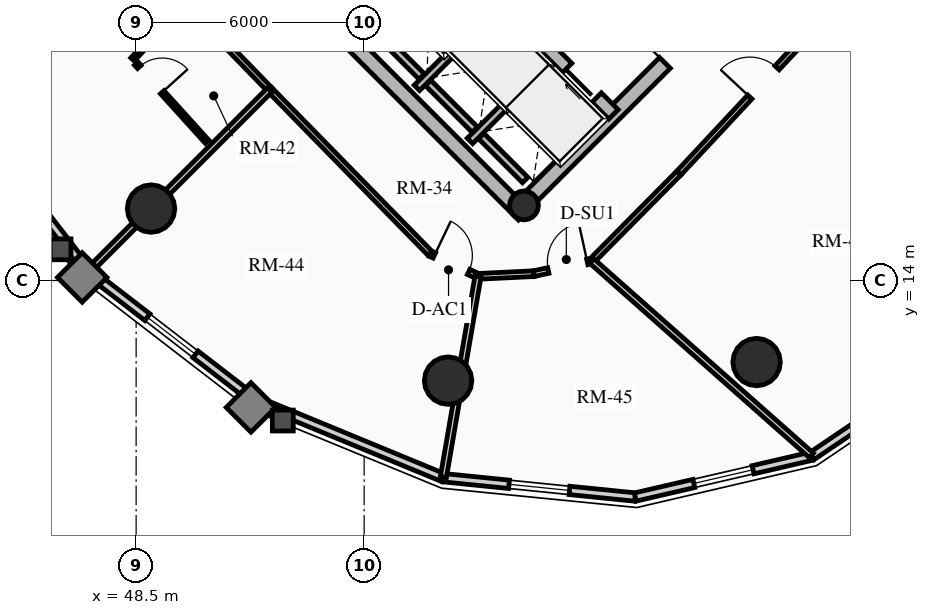
"""IFC4 building model, lengths in metres.
Left out: names, types, materials, properties, quantities, classifications, styles, units other than length and angle.
Written with IfcOpenShell. Run it as: python <this file> out.ifc"""

import sys

from ifc_helpers import new_model, si_unit, direction, frame, frame_2d, origin, origin_2d, place, context, subcontext, project, spatial, rectangle, circle, hollow_circle, extrude, source, transform, mapped, element, fill, save


model = new_model("IFC4")
c1 = context("Model", 3, precision=1e-05, world=origin(), true_north=direction((0.0, 1.0)))
c2 = subcontext(c1, "Body", "Model", "MODEL_VIEW")
j1 = project(units=[si_unit("LENGTHUNIT", "METRE"), si_unit("PLANEANGLEUNIT", "RADIAN")], contexts=[c1])
p1 = place(None, origin())
s1 = spatial("IfcSite", under=j1, at=p1, CompositionType="ELEMENT")
p2 = place(p1, origin())
s2 = spatial("IfcBuilding", under=s1, at=p2, CompositionType="ELEMENT")
p3 = place(p2, frame((0.0, 0.0, 151.6)))
s3 = spatial("IfcBuildingStorey", under=s2, at=p3, CompositionType="ELEMENT", Elevation=151.6)
p4 = place(p3, frame((58.702, 15.732, 0.0), z_axis=(0.0, 0.0, 1.0), x_axis=(-0.707106781187, 0.707106781187, 0.0)))
e1 = element("IfcWall", 1, at=p4, inside=s3, PredefinedType="SHEAR", context=c2, shape_type="SweptSolid", body=[
    extrude(rectangle(XDim=14.1, YDim=0.4, at=frame_2d((7.05, 0.0))), origin(), (0.0, 0.0, 1.0), 2.91),
])
p5 = place(p3, frame((58.561, 15.873, 0.0), z_axis=(0.0, 0.0, 1.0), x_axis=(0.707106781187, 0.707106781187, 0.0)))
e2 = element("IfcWall", 2, at=p5, inside=s3, PredefinedType="SHEAR", context=c2, shape_type="SweptSolid", body=[
    extrude(rectangle(XDim=10.7, YDim=0.4, at=frame_2d((5.35, 0.0))), origin(), (0.0, 0.0, 1.0), 2.91),
])
m1 = source(origin(), c2, "Body", "SweptSolid", [
    extrude(rectangle(XDim=1.5, YDim=2.02, at=frame_2d((0.75, 1.01))), frame((0.0, 0.21, 0.0), z_axis=(0.0, -1.0, 0.0), x_axis=(1.0, 0.0, 0.0)), (0.0, 0.0, 1.0), 0.42),
])
p6 = place(p5, frame((5.45, 0.0, 0.0)))
e3 = element("IfcOpeningElement", 3, at=p6, cuts=e2, PredefinedType="OPENING", context=c2, shape_type="MappedRepresentation", body=[
    mapped(m1, transform((0.0, 0.0, 0.0), x_axis=(1.0, 0.0, 0.0), y_axis=(0.0, 1.0, 0.0), z_axis=(0.0, 0.0, 1.0), scale=1.0)),
])
p7 = place(p3, frame((61.06, 18.373, 0.0), z_axis=(0.0, 0.0, 1.0), x_axis=(-0.707106781187, 0.707106781187, 0.0)))
e4 = element("IfcWall", 4, at=p7, inside=s3, PredefinedType="SHEAR", context=c2, shape_type="SweptSolid", body=[
    extrude(rectangle(XDim=13.7, YDim=0.35, at=frame_2d((6.85, 0.0))), origin(), (0.0, 0.0, 1.0), 2.91),
])
m2 = source(origin(), c2, "Body", "SweptSolid", [
    extrude(rectangle(XDim=1.1, YDim=2.015, at=frame_2d((0.55, 1.007))), frame((0.0, 0.185, 0.0), z_axis=(0.0, -1.0, 0.0), x_axis=(1.0, 0.0, 0.0)), (0.0, 0.0, 1.0), 0.37),
])
p8 = place(p7, frame((4.85, 0.0, 0.0)))
e5 = element("IfcOpeningElement", 5, at=p8, cuts=e4, PredefinedType="OPENING", context=c2, shape_type="MappedRepresentation", body=[
    mapped(m2, transform((0.0, 0.0, 0.0), x_axis=(1.0, 0.0, 0.0), y_axis=(0.0, 1.0, 0.0), z_axis=(0.0, 0.0, 1.0), scale=1.0)),
])
p9 = place(p7, frame((0.625, 0.0, 0.0)))
e6 = element("IfcOpeningElement", 6, at=p9, cuts=e4, PredefinedType="OPENING", context=c2, shape_type="MappedRepresentation", body=[
    mapped(m2, transform((0.0, 0.0, 0.0), x_axis=(1.0, 0.0, 0.0), y_axis=(0.0, 1.0, 0.0), z_axis=(0.0, 0.0, 1.0), scale=1.0)),
])
p10 = place(p7, frame((2.625, 0.0, 0.0)))
e7 = element("IfcOpeningElement", 7, at=p10, cuts=e4, PredefinedType="OPENING", context=c2, shape_type="MappedRepresentation", body=[
    mapped(m2, transform((0.0, 0.0, 0.0), x_axis=(1.0, 0.0, 0.0), y_axis=(0.0, 1.0, 0.0), z_axis=(0.0, 0.0, 1.0), scale=1.0)),
])
m3 = source(origin(), c2, "Body", "SweptSolid", [
    extrude(rectangle(XDim=1.15, YDim=2.02, at=frame_2d((0.575, 1.01))), frame((0.0, 0.185, 0.0), z_axis=(0.0, -1.0, 0.0), x_axis=(1.0, 0.0, 0.0)), (0.0, 0.0, 1.0), 0.37),
])
p11 = place(p7, frame((7.27, 0.0, 0.0)))
e8 = element("IfcOpeningElement", 8, at=p11, cuts=e4, PredefinedType="OPENING", context=c2, shape_type="MappedRepresentation", body=[
    mapped(m3, transform((0.0, 0.0, 0.0), x_axis=(1.0, 0.0, 0.0), y_axis=(0.0, 1.0, 0.0), z_axis=(0.0, 0.0, 1.0), scale=1.0)),
])
p12 = place(p3, frame((58.706, 15.976, 0.0), z_axis=(0.0, 0.0, 1.0), x_axis=(0.707106781187, 0.707106781187, 0.0)))
e9 = element("IfcColumn", 9, at=p12, inside=s3, PredefinedType="COLUMN", context=c2, shape_type="SweptSolid", body=[
    extrude(hollow_circle(Radius=0.38, WallThickness=0.032, at=origin_2d()), origin(), (0.0, 0.0, 1.0), 2.91),
])
for number, where, z_axis, x_axis in (
    (10, (48.893, 15.893, 0.0), (0.0, 0.0, 1.0), (1.0, 0.0, 0.0)),
    (11, (56.709, 11.365, 0.0), (0.0, 0.0, 1.0), (1.0, 0.0, 0.0)),
    (12, (64.827, 11.854, 0.0), (0.0, 0.0, 1.0), (1.0, 0.0, 0.0)),
):
    element("IfcColumn", number, at=place(p3, frame(where, z_axis=z_axis, x_axis=x_axis)), inside=s3, PredefinedType="USERDEFINED", context=c2, shape_type="SweptSolid", body=[
        extrude(circle(Radius=0.625, at=origin_2d()), origin(), (0.0, 0.0, 1.0), 2.91),
    ])
p13 = place(p3, frame((47.236, 14.236, 0.0), z_axis=(0.0, 0.0, 1.0), x_axis=(-0.610543584779, 0.791982658323, 0.0)))
e13 = element("IfcWall", 13, at=p13, inside=s3, PredefinedType="SOLIDWALL", context=c2, shape_type="SweptSolid", body=[
    extrude(rectangle(XDim=5.537, YDim=0.22, at=frame_2d((2.769, 0.0))), origin(), (0.0, 0.0, 1.0), 2.245),
])
p14 = place(p3, frame((51.622, 10.856, 0.0), z_axis=(0.0, 0.0, 1.0), x_axis=(-0.791982658323, 0.610543584779, 0.0)))
e14 = element("IfcWall", 14, at=p14, inside=s3, PredefinedType="SOLIDWALL", context=c2, shape_type="SweptSolid", body=[
    extrude(rectangle(XDim=5.537, YDim=0.22, at=frame_2d((2.769, 0.0))), origin(), (0.0, 0.0, 1.0), 2.245),
])
m4 = source(origin(), c2, "Body", "SweptSolid", [
    extrude(rectangle(XDim=1.6, YDim=1.3, at=frame_2d((0.8, 0.65))), frame((0.0, 0.12, 0.0), z_axis=(0.0, -1.0, 0.0), x_axis=(1.0, 0.0, 0.0)), (0.0, 0.0, 1.0), 0.24),
])
p15 = place(p14, frame((1.968, 0.0, 0.65)))
e15 = element("IfcOpeningElement", 15, at=p15, cuts=e14, PredefinedType="OPENING", context=c2, shape_type="MappedRepresentation", body=[
    mapped(m4, transform((0.0, 0.0, 0.0), x_axis=(1.0, 0.0, 0.0), y_axis=(0.0, 1.0, 0.0), z_axis=(0.0, 0.0, 1.0), scale=1.0)),
])
p16 = place(p3, frame((56.582, 8.811, 0.0), z_axis=(0.0, 0.0, 1.0), x_axis=(-0.924528197738, 0.38111364655, 0.0)))
e16 = element("IfcWall", 16, at=p16, inside=s3, PredefinedType="SOLIDWALL", context=c2, shape_type="SweptSolid", body=[
    extrude(rectangle(XDim=5.366, YDim=0.22, at=frame_2d((2.683, 0.0))), origin(), (0.0, 0.0, 1.0), 2.245),
])
p17 = place(p3, frame((61.633, 8.302, 0.0), z_axis=(0.0, 0.0, 1.0), x_axis=(-0.994959267396, 0.100279889424, 0.0)))
e17 = element("IfcWall", 17, at=p17, inside=s3, PredefinedType="SOLIDWALL", context=c2, shape_type="SweptSolid", body=[
    extrude(rectangle(XDim=5.076, YDim=0.22, at=frame_2d((2.538, 0.0))), origin(), (0.0, 0.0, 1.0), 2.245),
])
p18 = place(p17, frame((1.738, 0.0, 0.65)))
e18 = element("IfcOpeningElement", 18, at=p18, cuts=e17, PredefinedType="OPENING", context=c2, shape_type="MappedRepresentation", body=[
    mapped(m4, transform((0.0, 0.0, 0.0), x_axis=(1.0, 0.0, 0.0), y_axis=(0.0, 1.0, 0.0), z_axis=(0.0, 0.0, 1.0), scale=1.0)),
])
p19 = place(p3, frame((66.279, 9.378, 0.0), z_axis=(0.0, 0.0, 1.0), x_axis=(-0.974206226622, -0.225659540039, 0.0)))
e19 = element("IfcWall", 19, at=p19, inside=s3, PredefinedType="SOLIDWALL", context=c2, shape_type="SweptSolid", body=[
    extrude(rectangle(XDim=4.769, YDim=0.22, at=frame_2d((2.385, 0.0))), origin(), (0.0, 0.0, 1.0), 2.245),
])
p20 = place(p19, frame((1.585, 0.0, 0.65)))
e20 = element("IfcOpeningElement", 20, at=p20, cuts=e19, PredefinedType="OPENING", context=c2, shape_type="MappedRepresentation", body=[
    mapped(m4, transform((0.0, 0.0, 0.0), x_axis=(1.0, 0.0, 0.0), y_axis=(0.0, 1.0, 0.0), z_axis=(0.0, 0.0, 1.0), scale=1.0)),
])
p21 = place(p3, frame((70.065, 11.935, 0.0), z_axis=(0.0, 0.0, 1.0), x_axis=(-0.828739009952, -0.559635286042, 0.0)))
e21 = element("IfcWall", 21, at=p21, inside=s3, PredefinedType="SOLIDWALL", context=c2, shape_type="SweptSolid", body=[
    extrude(rectangle(XDim=4.569, YDim=0.22, at=frame_2d((2.284, 0.0))), origin(), (0.0, 0.0, 1.0), 2.245),
])
p22 = place(p3, frame((55.888, 19.069, 0.0), z_axis=(0.0, 0.0, 1.0), x_axis=(0.707106781187, 0.707106781187, 0.0)))
e22 = element("IfcWall", 22, at=p22, inside=s3, PredefinedType="SHEAR", context=c2, shape_type="SweptSolid", body=[
    extrude(rectangle(XDim=2.97, YDim=0.2, at=frame_2d((1.485, 0.0))), origin(), (0.0, 0.0, 1.0), 2.91),
])
p23 = place(p3, frame((56.015, 19.366, 0.0), z_axis=(0.0, 0.0, 1.0), x_axis=(-0.707106781187, 0.707106781187, 0.0)))
e23 = element("IfcWall", 23, at=p23, inside=s3, PredefinedType="SHEAR", context=c2, shape_type="SweptSolid", body=[
    extrude(rectangle(XDim=2.44, YDim=0.2, at=frame_2d((1.22, 0.0))), origin(), (0.0, 0.0, 1.0), 2.91),
])
p24 = place(p3, frame((57.284, 17.673, 0.0), z_axis=(0.0, 0.0, 1.0), x_axis=(0.707147878904, 0.70706568108, 0.0)))
e24 = element("IfcWall", 24, at=p24, inside=s3, PredefinedType="SHEAR", context=c2, shape_type="SweptSolid", body=[
    extrude(rectangle(XDim=2.97, YDim=0.2, at=frame_2d((1.485, 0.0))), origin(), (0.0, 0.0, 1.0), 2.91),
])
p25 = place(p3, frame((57.412, 17.97, 0.0), z_axis=(0.0, 0.0, 1.0), x_axis=(-0.707106781187, 0.707106781187, 0.0)))
e25 = element("IfcWall", 25, at=p25, inside=s3, PredefinedType="SHEAR", context=c2, shape_type="SweptSolid", body=[
    extrude(rectangle(XDim=1.735, YDim=0.2, at=frame_2d((0.867, 0.0))), origin(), (0.0, 0.0, 1.0), 2.91),
])
p26 = place(p3, frame((58.737, 16.644, 0.0), z_axis=(0.0, 0.0, 1.0), x_axis=(-0.707032117043, 0.707181437447, 0.0)))
e26 = element("IfcWall", 26, at=p26, inside=s3, PredefinedType="SHEAR", context=c2, shape_type="SweptSolid", body=[
    extrude(rectangle(XDim=1.635, YDim=0.2, at=frame_2d((0.817, 0.0))), origin(), (0.0, 0.0, 1.0), 2.91),
])
p27 = place(p3, frame((47.901, 23.265, 0.0), z_axis=(0.0, 0.0, 1.0), x_axis=(0.696355965374, -0.717696572019, 0.0)))
e27 = element("IfcWall", 27, at=p27, inside=s3, PredefinedType="PARTITIONING", context=c2, shape_type="SweptSolid", body=[
    extrude(rectangle(XDim=5.915, YDim=0.15, at=frame_2d((2.957, 0.0))), origin(), (0.0, 0.0, 1.0), 2.675),
])
p28 = place(p3, frame((52.02, 19.02, 0.0), z_axis=(0.0, 0.0, 1.0), x_axis=(0.699456449804, -0.71467522332, 0.0)))
e28 = element("IfcWall", 28, at=p28, inside=s3, PredefinedType="PARTITIONING", context=c2, shape_type="SweptSolid", body=[
    extrude(rectangle(XDim=6.032, YDim=0.15, at=frame_2d((3.016, 0.0))), origin(), (0.0, 0.0, 1.0), 2.245),
])
p29 = place(p3, frame((56.239, 14.709, 0.0), z_axis=(0.0, 0.0, 1.0), x_axis=(0.902374219125, -0.430953325383, 0.0)))
e29 = element("IfcWall", 29, at=p29, inside=s3, PredefinedType="PARTITIONING", context=c2, shape_type="SweptSolid", body=[
    extrude(rectangle(XDim=1.394, YDim=0.15, at=frame_2d((0.697, 0.0))), origin(), (0.0, 0.0, 1.0), 2.245),
])
m5 = source(origin(), c2, "Body", "SweptSolid", [
    extrude(rectangle(XDim=1.0, YDim=2.015, at=frame_2d((0.5, 1.007))), frame((0.0, 0.085, 0.0), z_axis=(0.0, -1.0, 0.0), x_axis=(1.0, 0.0, 0.0)), (0.0, 0.0, 1.0), 0.17),
])
p30 = place(p29, frame((0.12, 0.0, 0.0)))
e30 = element("IfcOpeningElement", 30, at=p30, cuts=e29, PredefinedType="OPENING", context=c2, shape_type="MappedRepresentation", body=[
    mapped(m5, transform((0.0, 0.0, 0.0), x_axis=(1.0, 0.0, 0.0), y_axis=(0.0, 1.0, 0.0), z_axis=(0.0, 0.0, 1.0), scale=1.0)),
])
p31 = place(p3, frame((57.497, 14.109, 0.0), z_axis=(0.0, 0.0, 1.0), x_axis=(0.998828286318, 0.048394777109, 0.0)))
e31 = element("IfcWall", 31, at=p31, inside=s3, PredefinedType="PARTITIONING", context=c2, shape_type="SweptSolid", body=[
    extrude(rectangle(XDim=1.468, YDim=0.15, at=frame_2d((0.734, 0.0))), origin(), (0.0, 0.0, 1.0), 2.245),
])
p32 = place(p3, frame((58.963, 14.18, 0.0), z_axis=(0.0, 0.0, 1.0), x_axis=(0.976826524015, 0.214032572243, 0.0)))
e32 = element("IfcWall", 32, at=p32, inside=s3, PredefinedType="PARTITIONING", context=c2, shape_type="SweptSolid", body=[
    extrude(rectangle(XDim=1.562, YDim=0.15, at=frame_2d((0.781, 0.0))), origin(), (0.0, 0.0, 1.0), 2.245),
])
m6 = source(origin(), c2, "Body", "SweptSolid", [
    extrude(rectangle(XDim=1.05, YDim=2.015, at=frame_2d((0.525, 1.007))), frame((0.0, 0.085, 0.0), z_axis=(0.0, -1.0, 0.0), x_axis=(1.0, 0.0, 0.0)), (0.0, 0.0, 1.0), 0.17),
])
p33 = place(p32, frame((0.392, 0.0, 0.0)))
e33 = element("IfcOpeningElement", 33, at=p33, cuts=e32, PredefinedType="OPENING", context=c2, shape_type="MappedRepresentation", body=[
    mapped(m6, transform((0.0, 0.0, 0.0), x_axis=(1.0, 0.0, 0.0), y_axis=(0.0, 1.0, 0.0), z_axis=(0.0, 0.0, 1.0), scale=1.0)),
])
p34 = place(p3, frame((60.488, 14.514, 0.0), z_axis=(0.0, 0.0, 1.0), x_axis=(0.703880260405, 0.71031864611, 0.0)))
e34 = element("IfcWall", 34, at=p34, inside=s3, PredefinedType="PARTITIONING", context=c2, shape_type="SweptSolid", body=[
    extrude(rectangle(XDim=3.261, YDim=0.15, at=frame_2d((1.63, 0.0))), origin(), (0.0, 0.0, 1.0), 2.245),
])
p35 = place(p3, frame((62.784, 16.83, 0.0), z_axis=(0.0, 0.0, 1.0), x_axis=(0.682240832942, 0.731127516831, 0.0)))
e35 = element("IfcWall", 35, at=p35, inside=s3, PredefinedType="PARTITIONING", context=c2, shape_type="SweptSolid", body=[
    extrude(rectangle(XDim=6.517, YDim=0.15, at=frame_2d((3.259, 0.0))), origin(), (0.0, 0.0, 1.0), 2.245),
])
p36 = place(p35, frame((2.734, 0.0, 0.0)))
e36 = element("IfcOpeningElement", 36, at=p36, cuts=e35, PredefinedType="OPENING", context=c2, shape_type="MappedRepresentation", body=[
    mapped(m6, transform((0.0, 0.0, 0.0), x_axis=(1.0, 0.0, 0.0), y_axis=(0.0, 1.0, 0.0), z_axis=(0.0, 0.0, 1.0), scale=1.0)),
])
p37 = place(p3, frame((52.02, 19.02, 0.0), z_axis=(0.0, 0.0, 1.0), x_axis=(-0.707106781187, -0.707106781187, 0.0)))
e37 = element("IfcWall", 37, at=p37, inside=s3, PredefinedType="PARTITIONING", context=c2, shape_type="SweptSolid", body=[
    extrude(rectangle(XDim=6.745, YDim=0.16, at=frame_2d((3.373, 0.0))), origin(), (0.0, 0.0, 1.0), 2.245),
])
p38 = place(p3, frame((57.497, 14.109, 0.0), z_axis=(0.0, 0.0, 1.0), x_axis=(-0.170109923992, -0.985425092922, 0.0)))
e38 = element("IfcWall", 38, at=p38, inside=s3, PredefinedType="PARTITIONING", context=c2, shape_type="SweptSolid", body=[
    extrude(rectangle(XDim=5.356, YDim=0.16, at=frame_2d((2.678, 0.0))), origin(), (0.0, 0.0, 1.0), 2.245),
])
p39 = place(p3, frame((60.488, 14.514, 0.0), z_axis=(0.0, 0.0, 1.0), x_axis=(0.748740614849, -0.662863101761, 0.0)))
e39 = element("IfcWall", 39, at=p39, inside=s3, PredefinedType="PARTITIONING", context=c2, shape_type="SweptSolid", body=[
    extrude(rectangle(XDim=7.721, YDim=0.16, at=frame_2d((3.861, 0.0))), origin(), (0.0, 0.0, 1.0), 2.245),
])
p40 = place(p3, frame((67.23, 21.595, 0.0), z_axis=(0.0, 0.0, 1.0), x_axis=(0.67560509773, -0.737263692258, 0.0)))
e40 = element("IfcWall", 40, at=p40, inside=s3, PredefinedType="PARTITIONING", context=c2, shape_type="SweptSolid", body=[
    extrude(rectangle(XDim=7.955, YDim=0.16, at=frame_2d((3.978, 0.0))), origin(), (0.0, 0.0, 1.0), 2.245),
])
p41 = place(p3, frame((49.665, 21.171, 0.0), z_axis=(0.0, 0.0, 1.0), x_axis=(-0.681089123144, -0.73220052331, 0.0)))
e41 = element("IfcWall", 41, at=p41, inside=s3, PredefinedType="PARTITIONING", context=c2, shape_type="SweptSolid", body=[
    extrude(rectangle(XDim=1.849, YDim=0.125, at=frame_2d((0.924, 0.0))), origin(), (0.0, 0.0, 1.0), 2.675),
])
p42 = place(p3, frame((48.503, 19.711, 0.0), z_axis=(0.0, 0.0, 1.0), x_axis=(0.671201050003, -0.741275354018, 0.0)))
e42 = element("IfcWall", 42, at=p42, inside=s3, PredefinedType="PARTITIONING", context=c2, shape_type="SweptSolid", body=[
    extrude(rectangle(XDim=2.777, YDim=0.125, at=frame_2d((1.388, 0.0))), origin(), (0.0, 0.0, 1.0), 2.675),
])
m7 = source(origin(), c2, "Body", "SweptSolid", [
    extrude(rectangle(XDim=0.9, YDim=2.005, at=frame_2d((0.45, 1.002))), frame((0.0, 0.073, 0.0), z_axis=(0.0, -1.0, 0.0), x_axis=(1.0, 0.0, 0.0)), (0.0, 0.0, 1.0), 0.145),
])
p43 = place(p42, frame((0.12, 0.0, 0.0)))
e43 = element("IfcOpeningElement", 43, at=p43, cuts=e42, PredefinedType="OPENING", context=c2, shape_type="MappedRepresentation", body=[
    mapped(m7, transform((0.0, 0.0, 0.0), x_axis=(1.0, 0.0, 0.0), y_axis=(0.0, 1.0, 0.0), z_axis=(0.0, 0.0, 1.0), scale=1.0)),
])
m8 = source(origin(), c2, "Body", "SweptSolid", [
    extrude(rectangle(XDim=1.6, YDim=1.3, at=frame_2d((0.8, 0.65))), frame((0.0, 0.03, 0.0), z_axis=(0.0, -1.0, 0.0), x_axis=(1.0, 0.0, 0.0)), (0.0, 0.0, 1.0), 0.06),
])
p44 = place(p15, origin())
e44 = element("IfcWindow", 44, at=p44, inside=s3, PartitioningType="SINGLE_PANEL", PredefinedType="WINDOW", context=c2, shape_type="MappedRepresentation", body=[
    mapped(m8, transform((0.0, 0.0, 0.0), x_axis=(1.0, 0.0, 0.0), y_axis=(0.0, 1.0, 0.0), z_axis=(0.0, 0.0, 1.0), scale=1.0)),
])
fill(e15, e44)
p45 = place(p18, origin())
e45 = element("IfcWindow", 45, at=p45, inside=s3, PartitioningType="SINGLE_PANEL", PredefinedType="WINDOW", context=c2, shape_type="MappedRepresentation", body=[
    mapped(m8, transform((0.0, 0.0, 0.0), x_axis=(1.0, 0.0, 0.0), y_axis=(0.0, 1.0, 0.0), z_axis=(0.0, 0.0, 1.0), scale=1.0)),
])
fill(e18, e45)
p46 = place(p20, origin())
e46 = element("IfcWindow", 46, at=p46, inside=s3, PartitioningType="SINGLE_PANEL", PredefinedType="WINDOW", context=c2, shape_type="MappedRepresentation", body=[
    mapped(m8, transform((0.0, 0.0, 0.0), x_axis=(1.0, 0.0, 0.0), y_axis=(0.0, 1.0, 0.0), z_axis=(0.0, 0.0, 1.0), scale=1.0)),
])
fill(e20, e46)
m9 = source(origin(), c2, "Body", "SweptSolid", [
    extrude(rectangle(XDim=1.1, YDim=2.015, at=frame_2d((0.55, 1.007))), frame((0.0, 0.025, 0.0), z_axis=(0.0, -1.0, 0.0), x_axis=(1.0, 0.0, 0.0)), (0.0, 0.0, 1.0), 0.05),
])
p47 = place(p9, origin())
e47 = element("IfcDoor", 47, at=p47, inside=s3, OperationType="SLIDING_TO_RIGHT", PredefinedType="DOOR", context=c2, shape_type="MappedRepresentation", body=[
    mapped(m9, transform((0.0, 0.0, 0.0), x_axis=(1.0, 0.0, 0.0), y_axis=(0.0, 1.0, 0.0), z_axis=(0.0, 0.0, 1.0), scale=1.0)),
])
fill(e6, e47)
m10 = source(origin(), c2, "Body", "SweptSolid", [
    extrude(rectangle(XDim=1.5, YDim=2.02, at=frame_2d((0.75, 1.01))), frame((0.0, 0.025, 0.0), z_axis=(0.0, -1.0, 0.0), x_axis=(1.0, 0.0, 0.0)), (0.0, 0.0, 1.0), 0.05),
])
p48 = place(p6, origin())
e48 = element("IfcDoor", 48, at=p48, inside=s3, OperationType="DOUBLE_DOOR_SINGLE_SWING", PredefinedType="DOOR", context=c2, shape_type="MappedRepresentation", body=[
    mapped(m10, transform((0.0, 0.0, 0.0), x_axis=(1.0, 0.0, 0.0), y_axis=(0.0, 1.0, 0.0), z_axis=(0.0, 0.0, 1.0), scale=1.0)),
])
fill(e3, e48)
m11 = source(origin(), c2, "Body", "SweptSolid", [
    extrude(rectangle(XDim=0.9, YDim=2.005, at=frame_2d((0.45, 1.002))), frame((0.0, 0.025, 0.0), z_axis=(0.0, -1.0, 0.0), x_axis=(1.0, 0.0, 0.0)), (0.0, 0.0, 1.0), 0.05),
])
p49 = place(p43, origin())
e49 = element("IfcDoor", 49, at=p49, inside=s3, OperationType="SINGLE_SWING_RIGHT", PredefinedType="DOOR", context=c2, shape_type="MappedRepresentation", body=[
    mapped(m11, transform((0.0, 0.0, 0.0), x_axis=(1.0, 0.0, 0.0), y_axis=(0.0, 1.0, 0.0), z_axis=(0.0, 0.0, 1.0), scale=1.0)),
])
fill(e43, e49)
m12 = source(origin(), c2, "Body", "SweptSolid", [
    extrude(rectangle(XDim=1.0, YDim=2.015, at=frame_2d((0.5, 1.007))), frame((0.0, 0.025, 0.0), z_axis=(0.0, -1.0, 0.0), x_axis=(1.0, 0.0, 0.0)), (0.0, 0.0, 1.0), 0.05),
])
p50 = place(p30, origin())
e50 = element("IfcDoor", 50, at=p50, inside=s3, OperationType="SINGLE_SWING_LEFT", PredefinedType="DOOR", context=c2, shape_type="MappedRepresentation", body=[
    mapped(m12, transform((0.0, 0.0, 0.0), x_axis=(1.0, 0.0, 0.0), y_axis=(0.0, 1.0, 0.0), z_axis=(0.0, 0.0, 1.0), scale=1.0)),
])
fill(e30, e50)
m13 = source(origin(), c2, "Body", "SweptSolid", [
    extrude(rectangle(XDim=1.05, YDim=2.015, at=frame_2d((0.525, 1.007))), frame((0.0, 0.025, 0.0), z_axis=(0.0, -1.0, 0.0), x_axis=(1.0, 0.0, 0.0)), (0.0, 0.0, 1.0), 0.05),
])
p51 = place(p33, origin())
e51 = element("IfcDoor", 51, at=p51, inside=s3, OperationType="SINGLE_SWING_RIGHT", PredefinedType="DOOR", context=c2, shape_type="MappedRepresentation", body=[
    mapped(m13, transform((0.0, 0.0, 0.0), x_axis=(1.0, 0.0, 0.0), y_axis=(0.0, 1.0, 0.0), z_axis=(0.0, 0.0, 1.0), scale=1.0)),
])
fill(e33, e51)
p52 = place(p36, origin())
e52 = element("IfcDoor", 52, at=p52, inside=s3, OperationType="SINGLE_SWING_LEFT", PredefinedType="DOOR", context=c2, shape_type="MappedRepresentation", body=[
    mapped(m13, transform((0.0, 0.0, 0.0), x_axis=(1.0, 0.0, 0.0), y_axis=(0.0, 1.0, 0.0), z_axis=(0.0, 0.0, 1.0), scale=1.0)),
])
fill(e36, e52)
save(model, sys.argv[1])
